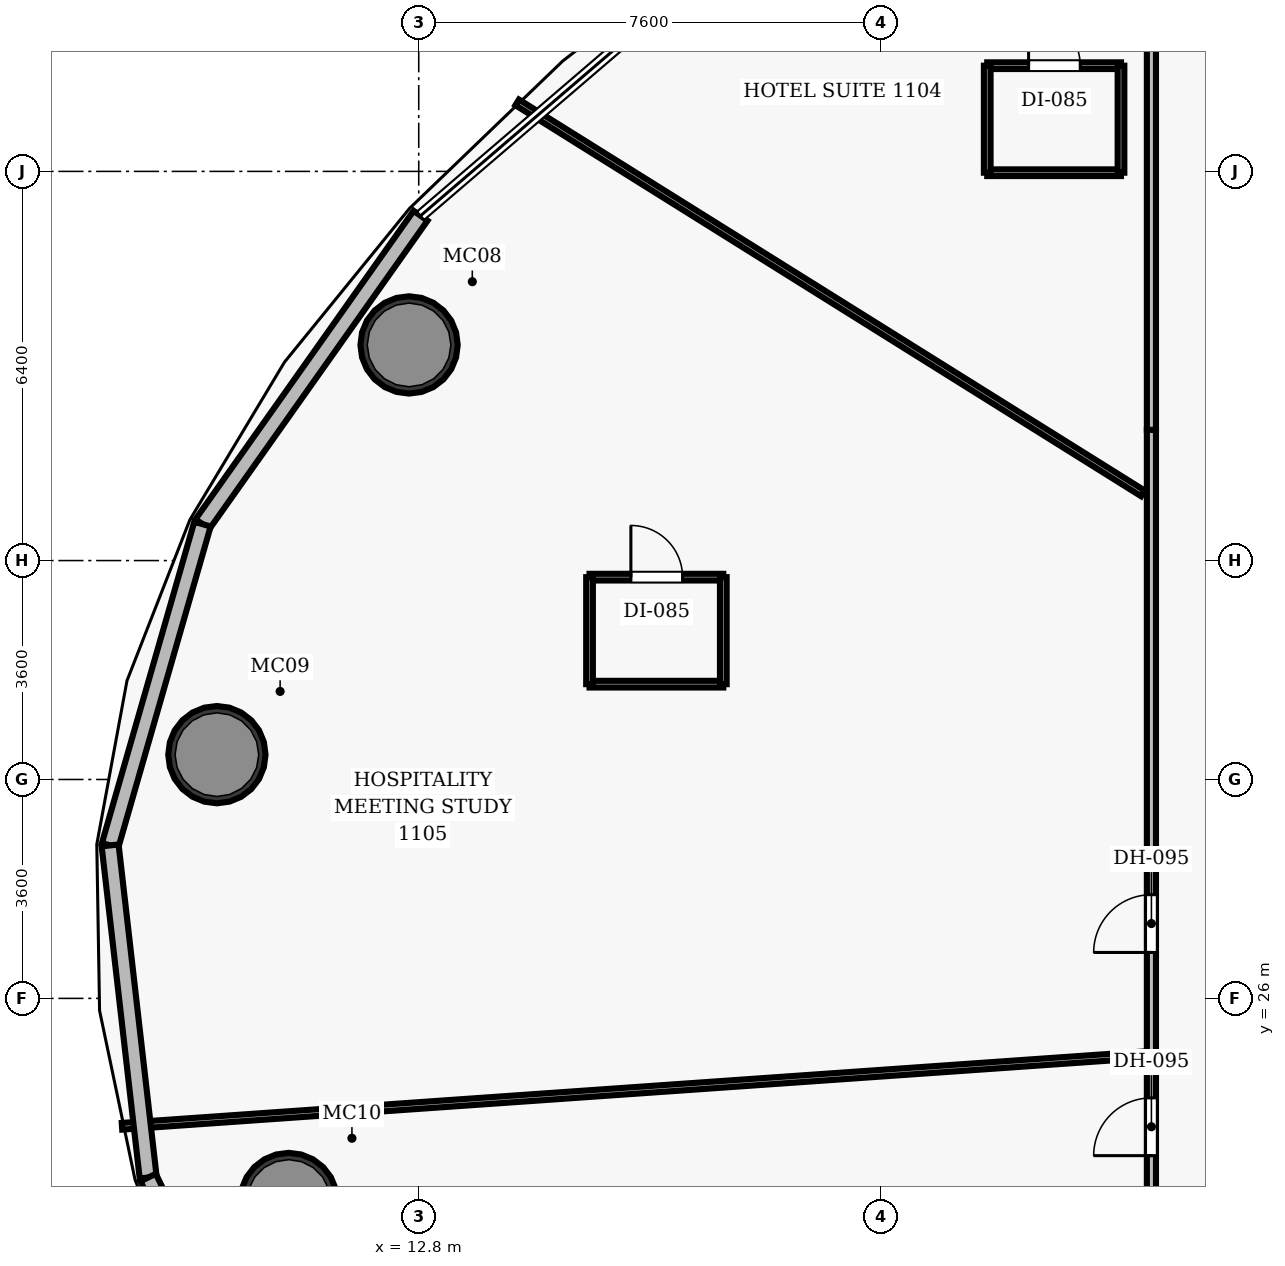
"""IFC4 building model, lengths in metres.
Left out: names, types, materials, properties, quantities, classifications, styles, units other than length and angle.
Written with IfcOpenShell. Run it as: python <this file> out.ifc"""

import sys

from ifc_helpers import new_model, si_unit, direction, frame, frame_2d, origin, origin_2d, place, context, subcontext, project, spatial, rectangle, hollow_circle, extrude, element, fill, save


model = new_model("IFC4")
c1 = context("Model", 3, precision=1e-05, world=origin(), true_north=direction((0.0, 1.0)))
c2 = subcontext(c1, "Body", "Model", "MODEL_VIEW")
j1 = project(units=[si_unit("LENGTHUNIT", "METRE"), si_unit("PLANEANGLEUNIT", "RADIAN")], contexts=[c1])
p1 = place(None, origin())
s1 = spatial("IfcSite", under=j1, at=p1, CompositionType="ELEMENT")
p2 = place(p1, origin())
s2 = spatial("IfcBuilding", under=s1, at=p2, CompositionType="ELEMENT")
p3 = place(p2, frame((0.0, 0.0, 55.4)))
s3 = spatial("IfcBuildingStorey", under=s2, at=p3, CompositionType="ELEMENT", Elevation=55.4)
for number, where, z_axis, x_axis in (
    (1, (12.641, 36.746, 0.0), (0.0, 0.0, 1.0), (1.0, 0.0, 0.0)),
    (2, (9.48, 30.008, 0.0), (0.0, 0.0, 1.0), (1.0, 0.0, 0.0)),
    (3, (10.661, 22.66, 0.0), (0.0, 0.0, 1.0), (1.0, 0.0, 0.0)),
):
    element("IfcColumn", number, at=place(p3, frame(where, z_axis=z_axis, x_axis=x_axis)), inside=s3, PredefinedType="COLUMN", context=c2, shape_type="SweptSolid", body=[
        extrude(hollow_circle(Radius=0.8, WallThickness=0.06, at=origin_2d()), origin(), (0.0, 0.0, 1.0), 3.5),
    ])
p4 = place(p3, frame((24.85, 19.45, 0.0), z_axis=(0.0, 0.0, 1.0), x_axis=(0.0, 1.0, 0.0)))
e4 = element("IfcWall", 4, at=p4, inside=s3, PredefinedType="PARTITIONING", context=c2, shape_type="SweptSolid", body=[
    extrude(rectangle(XDim=15.9, YDim=0.15, at=frame_2d((7.95, 0.0))), origin(), (0.0, 0.0, 1.0), 2.6),
])
p5 = place(p4, frame((7.305, 0.0, 0.0)))
e5 = element("IfcOpeningElement", 5, at=p5, cuts=e4, PredefinedType="OPENING", context=c2, shape_type="SweptSolid", body=[
    extrude(rectangle(XDim=0.95, YDim=2.15, at=frame_2d((0.475, 1.075))), frame((0.0, 0.085, 0.0), z_axis=(0.0, -1.0, 0.0), x_axis=(1.0, 0.0, 0.0)), (0.0, 0.0, 1.0), 0.17),
])
p6 = place(p4, frame((3.964, 0.0, 0.0)))
e6 = element("IfcOpeningElement", 6, at=p6, cuts=e4, PredefinedType="OPENING", context=c2, shape_type="SweptSolid", body=[
    extrude(rectangle(XDim=0.95, YDim=2.15, at=frame_2d((0.475, 1.075))), frame((0.0, 0.085, 0.0), z_axis=(0.0, -1.0, 0.0), x_axis=(1.0, 0.0, 0.0)), (0.0, 0.0, 1.0), 0.17),
])
p7 = place(p3, frame((24.85, 35.35, 0.0), z_axis=(0.0, 0.0, 1.0), x_axis=(0.0, 1.0, 0.0)))
e7 = element("IfcWall", 7, at=p7, inside=s3, PredefinedType="PARTITIONING", context=c2, shape_type="SweptSolid", body=[
    extrude(rectangle(XDim=10.15, YDim=0.15, at=frame_2d((5.075, 0.0))), origin(), (0.0, 0.0, 1.0), 2.6),
])
p8 = place(p3, frame((24.71, 34.304, 0.0), z_axis=(0.0, 0.0, 1.0), x_axis=(-0.848049161119, 0.529917559933, 0.0)))
e8 = element("IfcWall", 8, at=p8, inside=s3, PredefinedType="PARTITIONING", context=c2, shape_type="SweptSolid", body=[
    extrude(rectangle(XDim=12.135, YDim=0.11, at=frame_2d((6.068, 0.0))), origin(), (0.0, 0.0, 1.0), 2.6),
])
p9 = place(p3, frame((24.71, 25.071, 0.0), z_axis=(0.0, 0.0, 1.0), x_axis=(-0.997563188769, -0.069768792538, 0.0)))
e9 = element("IfcWall", 9, at=p9, inside=s3, PredefinedType="PARTITIONING", context=c2, shape_type="SweptSolid", body=[
    extrude(rectangle(XDim=16.832, YDim=0.11, at=frame_2d((8.416, 0.0))), origin(), (0.0, 0.0, 1.0), 2.6),
])
p10 = place(p3, frame((22.15, 39.578, 0.0), z_axis=(0.0, 0.0, 1.0), x_axis=(1.0, 0.0, 0.0)))
e10 = element("IfcWall", 10, at=p10, inside=s3, PredefinedType="PARTITIONING", context=c2, shape_type="SweptSolid", body=[
    extrude(rectangle(XDim=2.2, YDim=0.11, at=frame_2d((1.1, 0.0))), origin(), (0.0, 0.0, 1.0), 2.6),
])
p11 = place(p3, frame((22.15, 41.338, 0.0), z_axis=(0.0, 0.0, 1.0), x_axis=(1.0, 0.0, 0.0)))
e11 = element("IfcWall", 11, at=p11, inside=s3, PredefinedType="PARTITIONING", context=c2, shape_type="SweptSolid", body=[
    extrude(rectangle(XDim=2.2, YDim=0.11, at=frame_2d((1.1, 0.0))), origin(), (0.0, 0.0, 1.0), 2.6),
])
p12 = place(p11, frame((0.68, 0.0, 0.0)))
e12 = element("IfcOpeningElement", 12, at=p12, cuts=e11, PredefinedType="OPENING", context=c2, shape_type="SweptSolid", body=[
    extrude(rectangle(XDim=0.85, YDim=2.1, at=frame_2d((0.425, 1.05))), frame((0.0, 0.065, 0.0), z_axis=(0.0, -1.0, 0.0), x_axis=(1.0, 0.0, 0.0)), (0.0, 0.0, 1.0), 0.13),
])
for number, where, z_axis, x_axis in (
    (13, (22.15, 39.578, 0.0), (0.0, 0.0, 1.0), (0.0, 1.0, 0.0)),
    (14, (24.35, 39.578, 0.0), (0.0, 0.0, 1.0), (0.0, 1.0, 0.0)),
):
    element("IfcWall", number, at=place(p3, frame(where, z_axis=z_axis, x_axis=x_axis)), inside=s3, PredefinedType="PARTITIONING", context=c2, shape_type="SweptSolid", body=[
        extrude(rectangle(XDim=1.76, YDim=0.11, at=frame_2d((0.88, 0.0))), origin(), (0.0, 0.0, 1.0), 2.6),
    ])
p13 = place(p3, frame((15.609, 31.167, 0.0), z_axis=(0.0, 0.0, 1.0), x_axis=(1.0, 0.0, 0.0)))
e15 = element("IfcWall", 15, at=p13, inside=s3, PredefinedType="PARTITIONING", context=c2, shape_type="SweptSolid", body=[
    extrude(rectangle(XDim=2.2, YDim=0.11, at=frame_2d((1.1, 0.0))), origin(), (0.0, 0.0, 1.0), 2.6),
])
p14 = place(p3, frame((15.609, 32.927, 0.0), z_axis=(0.0, 0.0, 1.0), x_axis=(1.0, 0.0, 0.0)))
e16 = element("IfcWall", 16, at=p14, inside=s3, PredefinedType="PARTITIONING", context=c2, shape_type="SweptSolid", body=[
    extrude(rectangle(XDim=2.2, YDim=0.11, at=frame_2d((1.1, 0.0))), origin(), (0.0, 0.0, 1.0), 2.6),
])
p15 = place(p14, frame((0.68, 0.0, 0.0)))
e17 = element("IfcOpeningElement", 17, at=p15, cuts=e16, PredefinedType="OPENING", context=c2, shape_type="SweptSolid", body=[
    extrude(rectangle(XDim=0.85, YDim=2.1, at=frame_2d((0.425, 1.05))), frame((0.0, 0.065, 0.0), z_axis=(0.0, -1.0, 0.0), x_axis=(1.0, 0.0, 0.0)), (0.0, 0.0, 1.0), 0.13),
])
for number, where, z_axis, x_axis in (
    (18, (15.609, 31.167, 0.0), (0.0, 0.0, 1.0), (0.0, 1.0, 0.0)),
    (19, (17.809, 31.167, 0.0), (0.0, 0.0, 1.0), (0.0, 1.0, 0.0)),
):
    element("IfcWall", number, at=place(p3, frame(where, z_axis=z_axis, x_axis=x_axis)), inside=s3, PredefinedType="PARTITIONING", context=c2, shape_type="SweptSolid", body=[
        extrude(rectangle(XDim=1.76, YDim=0.11, at=frame_2d((0.88, 0.0))), origin(), (0.0, 0.0, 1.0), 2.6),
    ])
p16 = place(p3, frame((9.243, 33.799, 0.0), z_axis=(0.0, 0.0, 1.0), x_axis=(0.577462164913, 0.816417447201, 0.0)))
e20 = element("IfcWall", 20, at=p16, inside=s3, PredefinedType="SOLIDWALL", context=c2, shape_type="SweptSolid", body=[
    extrude(rectangle(XDim=6.212, YDim=0.28, at=frame_2d((3.106, 0.0))), origin(), (0.0, 0.0, 1.0), 3.25),
])
p17 = place(p3, frame((7.724, 28.516, 0.0), z_axis=(0.0, 0.0, 1.0), x_axis=(0.276263330445, 0.961081979985, 0.0)))
e21 = element("IfcWall", 21, at=p17, inside=s3, PredefinedType="SOLIDWALL", context=c2, shape_type="SweptSolid", body=[
    extrude(rectangle(XDim=5.498, YDim=0.28, at=frame_2d((2.749, 0.0))), origin(), (0.0, 0.0, 1.0), 3.25),
])
p18 = place(p3, frame((8.35, 23.054, 0.0), z_axis=(0.0, 0.0, 1.0), x_axis=(-0.113872248862, 0.993495400563, 0.0)))
e22 = element("IfcWall", 22, at=p18, inside=s3, PredefinedType="SOLIDWALL", context=c2, shape_type="SweptSolid", body=[
    extrude(rectangle(XDim=5.497, YDim=0.28, at=frame_2d((2.749, 0.0))), origin(), (0.0, 0.0, 1.0), 3.25),
])
p19 = place(p3, frame((11.051, 17.46, 0.0), z_axis=(0.0, 0.0, 1.0), x_axis=(-0.434783136193, 0.900535187809, 0.0)))
e23 = element("IfcWall", 23, at=p19, inside=s3, PredefinedType="SOLIDWALL", context=c2, shape_type="SweptSolid", body=[
    extrude(rectangle(XDim=6.212, YDim=0.28, at=frame_2d((3.106, 0.0))), origin(), (0.0, 0.0, 1.0), 3.25),
])
p20 = place(p12, origin())
e24 = element("IfcDoor", 24, at=p20, inside=s3, OperationType="SINGLE_SWING_LEFT", PredefinedType="DOOR", context=c2, shape_type="SweptSolid", body=[
    extrude(rectangle(XDim=0.85, YDim=2.1, at=frame_2d((0.425, 1.05))), frame((0.0, 0.025, 0.0), z_axis=(0.0, -1.0, 0.0), x_axis=(1.0, 0.0, 0.0)), (0.0, 0.0, 1.0), 0.05),
])
fill(e12, e24)
p21 = place(p5, origin())
e25 = element("IfcDoor", 25, at=p21, inside=s3, OperationType="SINGLE_SWING_LEFT", PredefinedType="DOOR", context=c2, shape_type="SweptSolid", body=[
    extrude(rectangle(XDim=0.95, YDim=2.15, at=frame_2d((0.475, 1.075))), frame((0.0, 0.025, 0.0), z_axis=(0.0, -1.0, 0.0), x_axis=(1.0, 0.0, 0.0)), (0.0, 0.0, 1.0), 0.05),
])
fill(e5, e25)
p22 = place(p15, origin())
e26 = element("IfcDoor", 26, at=p22, inside=s3, OperationType="SINGLE_SWING_LEFT", PredefinedType="DOOR", context=c2, shape_type="SweptSolid", body=[
    extrude(rectangle(XDim=0.85, YDim=2.1, at=frame_2d((0.425, 1.05))), frame((0.0, 0.025, 0.0), z_axis=(0.0, -1.0, 0.0), x_axis=(1.0, 0.0, 0.0)), (0.0, 0.0, 1.0), 0.05),
])
fill(e17, e26)
p23 = place(p6, origin())
e27 = element("IfcDoor", 27, at=p23, inside=s3, OperationType="SINGLE_SWING_LEFT", PredefinedType="DOOR", context=c2, shape_type="SweptSolid", body=[
    extrude(rectangle(XDim=0.95, YDim=2.15, at=frame_2d((0.475, 1.075))), frame((0.0, 0.025, 0.0), z_axis=(0.0, -1.0, 0.0), x_axis=(1.0, 0.0, 0.0)), (0.0, 0.0, 1.0), 0.05),
])
fill(e6, e27)
save(model, sys.argv[1])
